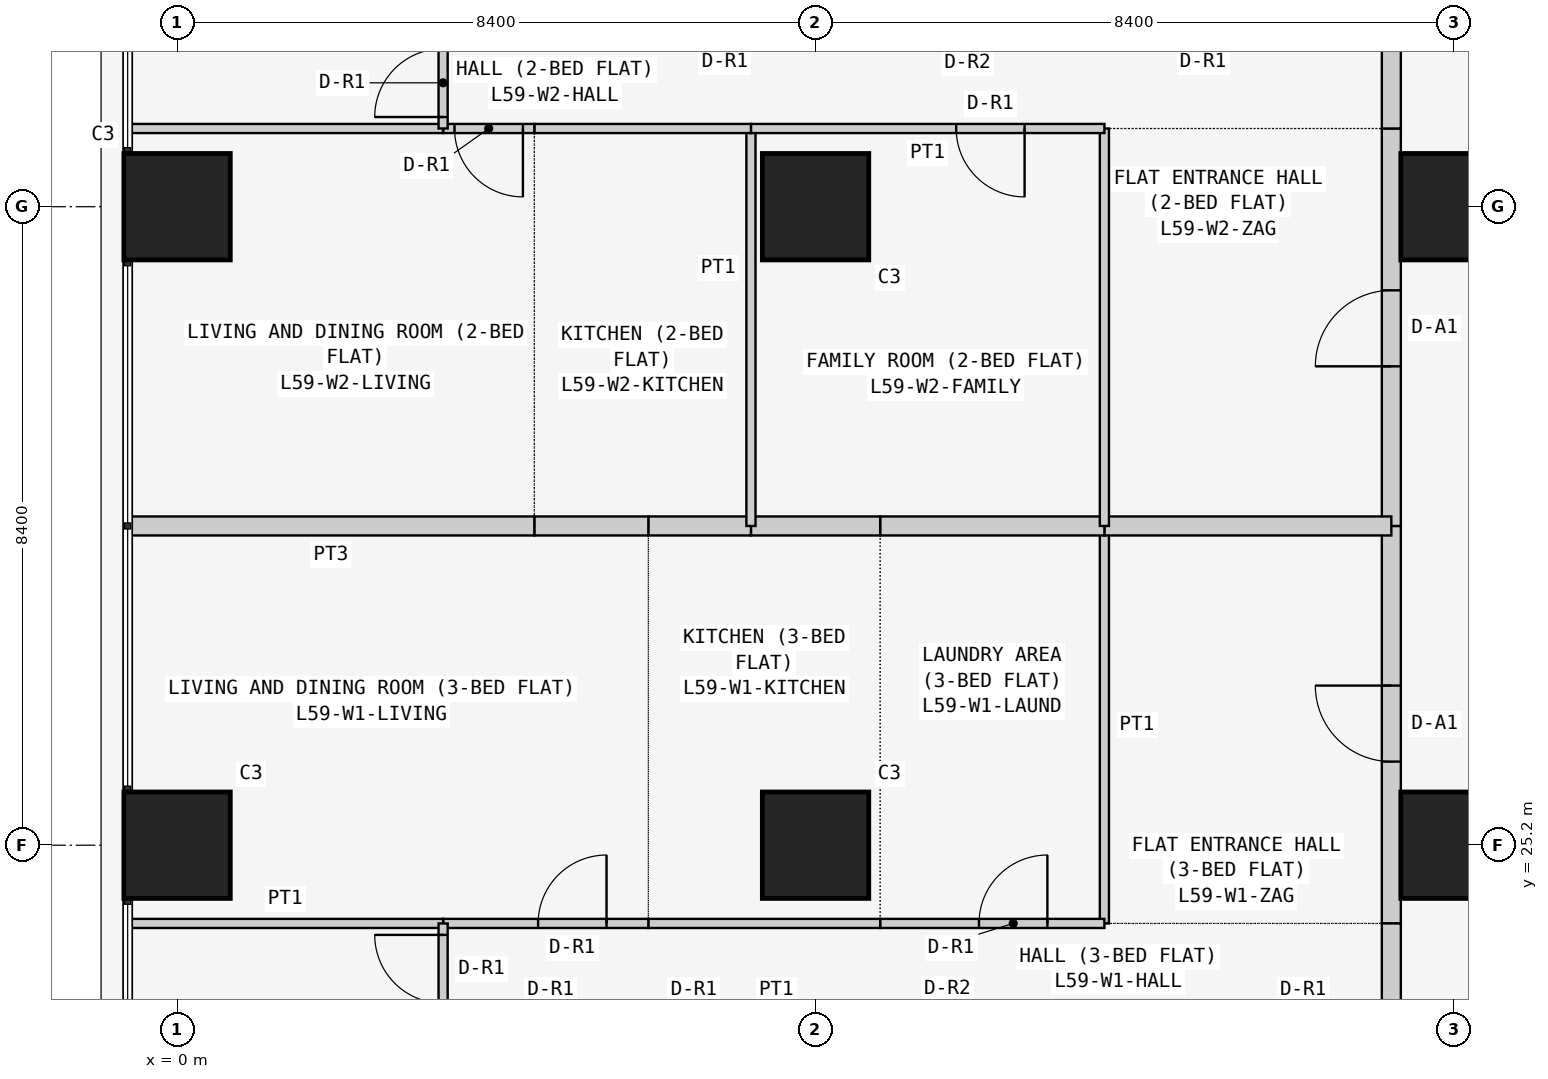
"""IFC4 building model, lengths in metres.
Left out: names, types, materials, properties, quantities, classifications, styles, units other than length and angle.
Written with IfcOpenShell. Run it as: python <this file> out.ifc"""

import sys

from ifc_helpers import new_model, si_unit, direction, frame, frame_2d, origin, origin_2d, place, context, subcontext, project, spatial, rectangle, extrude, element, fill, save


model = new_model("IFC4")
c1 = context("Model", 3, precision=1e-05, world=origin(), true_north=direction((0.0, 1.0)))
c2 = subcontext(c1, "Body", "Model", "MODEL_VIEW")
j1 = project(units=[si_unit("LENGTHUNIT", "METRE"), si_unit("PLANEANGLEUNIT", "RADIAN")], contexts=[c1])
p1 = place(None, origin())
s1 = spatial("IfcSite", under=j1, at=p1, CompositionType="ELEMENT")
p2 = place(p1, origin())
s2 = spatial("IfcBuilding", under=s1, at=p2, CompositionType="ELEMENT")
p3 = place(p2, frame((0.0, 0.0, 226.5)))
s3 = spatial("IfcBuildingStorey", under=s2, at=p3, CompositionType="ELEMENT", Elevation=226.5)
for number, where, z_axis, x_axis in (
    (1, (0.0, 25.2, 0.0), (0.0, 0.0, 1.0), (1.0, 0.0, 0.0)),
    (2, (0.0, 33.6, 0.0), (0.0, 0.0, 1.0), (1.0, 0.0, 0.0)),
    (3, (8.4, 25.2, 0.0), (0.0, 0.0, 1.0), (1.0, 0.0, 0.0)),
    (4, (8.4, 33.6, 0.0), (0.0, 0.0, 1.0), (1.0, 0.0, 0.0)),
    (5, (16.8, 25.2, 0.0), (0.0, 0.0, 1.0), (1.0, 0.0, 0.0)),
    (6, (16.8, 33.6, 0.0), (0.0, 0.0, 1.0), (1.0, 0.0, 0.0)),
):
    element("IfcColumn", number, at=place(p3, frame(where, z_axis=z_axis, x_axis=x_axis)), inside=s3, PredefinedType="COLUMN", context=c2, shape_type="SweptSolid", body=[
        extrude(rectangle(XDim=1.4, YDim=1.4, at=origin_2d()), origin(), (0.0, 0.0, 1.0), 3.6),
    ])
p4 = place(p3, frame((15.975, 24.171, 0.0), z_axis=(0.0, 0.0, 1.0), x_axis=(0.0, 1.0, 0.0)))
e7 = element("IfcWall", 7, at=p4, inside=s3, PredefinedType="PARTITIONING", context=c2, shape_type="SweptSolid", body=[
    extrude(rectangle(XDim=5.229, YDim=0.25, at=frame_2d((2.615, 0.0))), origin(), (0.0, 0.0, 1.0), 3.45),
])
p5 = place(p4, frame((2.129, 0.0, 0.0)))
e8 = element("IfcOpeningElement", 8, at=p5, cuts=e7, PredefinedType="OPENING", context=c2, shape_type="SweptSolid", body=[
    extrude(rectangle(XDim=1.0, YDim=2.1, at=frame_2d((0.5, 1.05))), frame((0.0, 0.135, 0.0), z_axis=(0.0, -1.0, 0.0), x_axis=(1.0, 0.0, 0.0)), (0.0, 0.0, 1.0), 0.27),
])
p6 = place(p3, frame((15.975, 22.971, 0.0), z_axis=(0.0, 0.0, 1.0), x_axis=(0.0, 1.0, 0.0)))
e9 = element("IfcWall", 9, at=p6, inside=s3, PredefinedType="PARTITIONING", context=c2, shape_type="SweptSolid", body=[
    extrude(rectangle(XDim=1.2, YDim=0.25, at=frame_2d((0.6, 0.0))), origin(), (0.0, 0.0, 1.0), 3.45),
])
p7 = place(p3, frame((15.975, 29.4, 0.0), z_axis=(0.0, 0.0, 1.0), x_axis=(0.0, 1.0, 0.0)))
e10 = element("IfcWall", 10, at=p7, inside=s3, PredefinedType="PARTITIONING", context=c2, shape_type="SweptSolid", body=[
    extrude(rectangle(XDim=5.229, YDim=0.25, at=frame_2d((2.615, 0.0))), origin(), (0.0, 0.0, 1.0), 3.45),
])
p8 = place(p7, frame((2.1, 0.0, 0.0)))
e11 = element("IfcOpeningElement", 11, at=p8, cuts=e10, PredefinedType="OPENING", context=c2, shape_type="SweptSolid", body=[
    extrude(rectangle(XDim=1.0, YDim=2.1, at=frame_2d((0.5, 1.05))), frame((0.0, 0.135, 0.0), z_axis=(0.0, -1.0, 0.0), x_axis=(1.0, 0.0, 0.0)), (0.0, 0.0, 1.0), 0.27),
])
p9 = place(p3, frame((15.975, 34.629, 0.0), z_axis=(0.0, 0.0, 1.0), x_axis=(0.0, 1.0, 0.0)))
e12 = element("IfcWall", 12, at=p9, inside=s3, PredefinedType="PARTITIONING", context=c2, shape_type="SweptSolid", body=[
    extrude(rectangle(XDim=1.2, YDim=0.25, at=frame_2d((0.6, 0.0))), origin(), (0.0, 0.0, 1.0), 3.45),
])
p10 = place(p3, frame((12.2, 29.4, 0.0), z_axis=(0.0, 0.0, 1.0), x_axis=(0.0, -1.0, 0.0)))
e13 = element("IfcWall", 13, at=p10, inside=s3, PredefinedType="PARTITIONING", context=c2, shape_type="SweptSolid", body=[
    extrude(rectangle(XDim=5.229, YDim=0.12, at=frame_2d((2.615, 0.0))), origin(), (0.0, 0.0, 1.0), 3.45),
])
p11 = place(p3, frame((15.975, 29.4, 0.0), z_axis=(0.0, 0.0, 1.0), x_axis=(-1.0, 0.0, 0.0)))
e14 = element("IfcWall", 14, at=p11, inside=s3, PredefinedType="PARTITIONING", context=c2, shape_type="SweptSolid", body=[
    extrude(rectangle(XDim=3.775, YDim=0.25, at=frame_2d((1.888, 0.0))), origin(), (0.0, 0.0, 1.0), 3.45),
])
p12 = place(p3, frame((9.25, 24.171, 0.0), z_axis=(0.0, 0.0, 1.0), x_axis=(1.0, 0.0, 0.0)))
e15 = element("IfcWall", 15, at=p12, inside=s3, PredefinedType="PARTITIONING", context=c2, shape_type="SweptSolid", body=[
    extrude(rectangle(XDim=2.95, YDim=0.12, at=frame_2d((1.475, 0.0))), origin(), (0.0, 0.0, 1.0), 3.45),
])
p13 = place(p12, frame((1.3, 0.0, 0.0)))
e16 = element("IfcOpeningElement", 16, at=p13, cuts=e15, PredefinedType="OPENING", context=c2, shape_type="SweptSolid", body=[
    extrude(rectangle(XDim=0.9, YDim=2.1, at=frame_2d((0.45, 1.05))), frame((0.0, 0.07, 0.0), z_axis=(0.0, -1.0, 0.0), x_axis=(1.0, 0.0, 0.0)), (0.0, 0.0, 1.0), 0.14),
])
p14 = place(p3, frame((12.2, 29.4, 0.0), z_axis=(0.0, 0.0, 1.0), x_axis=(-1.0, 0.0, 0.0)))
e17 = element("IfcWall", 17, at=p14, inside=s3, PredefinedType="PARTITIONING", context=c2, shape_type="SweptSolid", body=[
    extrude(rectangle(XDim=2.95, YDim=0.25, at=frame_2d((1.475, 0.0))), origin(), (0.0, 0.0, 1.0), 3.45),
])
p15 = place(p3, frame((6.2, 24.171, 0.0), z_axis=(0.0, 0.0, 1.0), x_axis=(1.0, 0.0, 0.0)))
e18 = element("IfcWall", 18, at=p15, inside=s3, PredefinedType="PARTITIONING", context=c2, shape_type="SweptSolid", body=[
    extrude(rectangle(XDim=3.05, YDim=0.12, at=frame_2d((1.525, 0.0))), origin(), (0.0, 0.0, 1.0), 3.45),
])
p16 = place(p3, frame((9.25, 29.4, 0.0), z_axis=(0.0, 0.0, 1.0), x_axis=(-1.0, 0.0, 0.0)))
e19 = element("IfcWall", 19, at=p16, inside=s3, PredefinedType="PARTITIONING", context=c2, shape_type="SweptSolid", body=[
    extrude(rectangle(XDim=1.7, YDim=0.25, at=frame_2d((0.85, 0.0))), origin(), (0.0, 0.0, 1.0), 3.45),
])
p17 = place(p3, frame((7.55, 29.4, 0.0), z_axis=(0.0, 0.0, 1.0), x_axis=(-1.0, 0.0, 0.0)))
e20 = element("IfcWall", 20, at=p17, inside=s3, PredefinedType="PARTITIONING", context=c2, shape_type="SweptSolid", body=[
    extrude(rectangle(XDim=1.35, YDim=0.25, at=frame_2d((0.675, 0.0))), origin(), (0.0, 0.0, 1.0), 3.45),
])
p18 = place(p3, frame((3.5, 24.171, 0.0), z_axis=(0.0, 0.0, 1.0), x_axis=(1.0, 0.0, 0.0)))
e21 = element("IfcWall", 21, at=p18, inside=s3, PredefinedType="PARTITIONING", context=c2, shape_type="SweptSolid", body=[
    extrude(rectangle(XDim=2.7, YDim=0.12, at=frame_2d((1.35, 0.0))), origin(), (0.0, 0.0, 1.0), 3.45),
])
p19 = place(p18, frame((1.25, 0.0, 0.0)))
e22 = element("IfcOpeningElement", 22, at=p19, cuts=e21, PredefinedType="OPENING", context=c2, shape_type="SweptSolid", body=[
    extrude(rectangle(XDim=0.9, YDim=2.1, at=frame_2d((0.45, 1.05))), frame((0.0, 0.07, 0.0), z_axis=(0.0, -1.0, 0.0), x_axis=(1.0, 0.0, 0.0)), (0.0, 0.0, 1.0), 0.14),
])
p20 = place(p3, frame((-0.65, 24.171, 0.0), z_axis=(0.0, 0.0, 1.0), x_axis=(1.0, 0.0, 0.0)))
e23 = element("IfcWall", 23, at=p20, inside=s3, PredefinedType="PARTITIONING", context=c2, shape_type="SweptSolid", body=[
    extrude(rectangle(XDim=4.15, YDim=0.12, at=frame_2d((2.075, 0.0))), origin(), (0.0, 0.0, 1.0), 3.45),
])
p21 = place(p3, frame((6.2, 29.4, 0.0), z_axis=(0.0, 0.0, 1.0), x_axis=(-1.0, 0.0, 0.0)))
e24 = element("IfcWall", 24, at=p21, inside=s3, PredefinedType="PARTITIONING", context=c2, shape_type="SweptSolid", body=[
    extrude(rectangle(XDim=1.5, YDim=0.25, at=frame_2d((0.75, 0.0))), origin(), (0.0, 0.0, 1.0), 3.45),
])
p22 = place(p3, frame((4.7, 29.4, 0.0), z_axis=(0.0, 0.0, 1.0), x_axis=(-1.0, 0.0, 0.0)))
e25 = element("IfcWall", 25, at=p22, inside=s3, PredefinedType="PARTITIONING", context=c2, shape_type="SweptSolid", body=[
    extrude(rectangle(XDim=5.35, YDim=0.25, at=frame_2d((2.675, 0.0))), origin(), (0.0, 0.0, 1.0), 3.45),
])
p23 = place(p3, frame((3.5, 24.171, 0.0), z_axis=(0.0, 0.0, 1.0), x_axis=(0.0, -1.0, 0.0)))
e26 = element("IfcWall", 26, at=p23, inside=s3, PredefinedType="PARTITIONING", context=c2, shape_type="SweptSolid", body=[
    extrude(rectangle(XDim=1.2, YDim=0.12, at=frame_2d((0.6, 0.0))), origin(), (0.0, 0.0, 1.0), 3.45),
])
p24 = place(p23, frame((0.151, 0.0, 0.0)))
e27 = element("IfcOpeningElement", 27, at=p24, cuts=e26, PredefinedType="OPENING", context=c2, shape_type="SweptSolid", body=[
    extrude(rectangle(XDim=0.9, YDim=2.1, at=frame_2d((0.45, 1.05))), frame((0.0, 0.07, 0.0), z_axis=(0.0, -1.0, 0.0), x_axis=(1.0, 0.0, 0.0)), (0.0, 0.0, 1.0), 0.14),
])
for number, where, z_axis, x_axis in (
    (28, (12.2, 29.4, 0.0), (0.0, 0.0, 1.0), (0.0, 1.0, 0.0)),
    (29, (7.55, 29.4, 0.0), (0.0, 0.0, 1.0), (0.0, 1.0, 0.0)),
):
    element("IfcWall", number, at=place(p3, frame(where, z_axis=z_axis, x_axis=x_axis)), inside=s3, PredefinedType="PARTITIONING", context=c2, shape_type="SweptSolid", body=[
        extrude(rectangle(XDim=5.229, YDim=0.12, at=frame_2d((2.615, 0.0))), origin(), (0.0, 0.0, 1.0), 3.45),
    ])
p25 = place(p3, frame((7.55, 34.629, 0.0), z_axis=(0.0, 0.0, 1.0), x_axis=(1.0, 0.0, 0.0)))
e30 = element("IfcWall", 30, at=p25, inside=s3, PredefinedType="PARTITIONING", context=c2, shape_type="SweptSolid", body=[
    extrude(rectangle(XDim=4.65, YDim=0.12, at=frame_2d((2.325, 0.0))), origin(), (0.0, 0.0, 1.0), 3.45),
])
p26 = place(p25, frame((2.7, 0.0, 0.0)))
e31 = element("IfcOpeningElement", 31, at=p26, cuts=e30, PredefinedType="OPENING", context=c2, shape_type="SweptSolid", body=[
    extrude(rectangle(XDim=0.9, YDim=2.1, at=frame_2d((0.45, 1.05))), frame((0.0, 0.07, 0.0), z_axis=(0.0, -1.0, 0.0), x_axis=(1.0, 0.0, 0.0)), (0.0, 0.0, 1.0), 0.14),
])
p27 = place(p3, frame((4.7, 34.629, 0.0), z_axis=(0.0, 0.0, 1.0), x_axis=(1.0, 0.0, 0.0)))
e32 = element("IfcWall", 32, at=p27, inside=s3, PredefinedType="PARTITIONING", context=c2, shape_type="SweptSolid", body=[
    extrude(rectangle(XDim=2.85, YDim=0.12, at=frame_2d((1.425, 0.0))), origin(), (0.0, 0.0, 1.0), 3.45),
])
p28 = place(p3, frame((3.5, 34.629, 0.0), z_axis=(0.0, 0.0, 1.0), x_axis=(1.0, 0.0, 0.0)))
e33 = element("IfcWall", 33, at=p28, inside=s3, PredefinedType="PARTITIONING", context=c2, shape_type="SweptSolid", body=[
    extrude(rectangle(XDim=1.2, YDim=0.12, at=frame_2d((0.6, 0.0))), origin(), (0.0, 0.0, 1.0), 3.45),
])
p29 = place(p28, frame((0.15, 0.0, 0.0)))
e34 = element("IfcOpeningElement", 34, at=p29, cuts=e33, PredefinedType="OPENING", context=c2, shape_type="SweptSolid", body=[
    extrude(rectangle(XDim=0.9, YDim=2.1, at=frame_2d((0.45, 1.05))), frame((0.0, 0.07, 0.0), z_axis=(0.0, -1.0, 0.0), x_axis=(1.0, 0.0, 0.0)), (0.0, 0.0, 1.0), 0.14),
])
p30 = place(p3, frame((-0.65, 34.629, 0.0), z_axis=(0.0, 0.0, 1.0), x_axis=(1.0, 0.0, 0.0)))
e35 = element("IfcWall", 35, at=p30, inside=s3, PredefinedType="PARTITIONING", context=c2, shape_type="SweptSolid", body=[
    extrude(rectangle(XDim=4.15, YDim=0.12, at=frame_2d((2.075, 0.0))), origin(), (0.0, 0.0, 1.0), 3.45),
])
p31 = place(p3, frame((3.5, 34.629, 0.0), z_axis=(0.0, 0.0, 1.0), x_axis=(0.0, 1.0, 0.0)))
e36 = element("IfcWall", 36, at=p31, inside=s3, PredefinedType="PARTITIONING", context=c2, shape_type="SweptSolid", body=[
    extrude(rectangle(XDim=1.2, YDim=0.12, at=frame_2d((0.6, 0.0))), origin(), (0.0, 0.0, 1.0), 3.45),
])
p32 = place(p31, frame((0.151, 0.0, 0.0)))
e37 = element("IfcOpeningElement", 37, at=p32, cuts=e36, PredefinedType="OPENING", context=c2, shape_type="SweptSolid", body=[
    extrude(rectangle(XDim=0.9, YDim=2.1, at=frame_2d((0.45, 1.05))), frame((0.0, 0.07, 0.0), z_axis=(0.0, -1.0, 0.0), x_axis=(1.0, 0.0, 0.0)), (0.0, 0.0, 1.0), 0.14),
])
p33 = place(p5, origin())
e38 = element("IfcDoor", 38, at=p33, inside=s3, OperationType="SINGLE_SWING_RIGHT", PredefinedType="DOOR", context=c2, shape_type="SweptSolid", body=[
    extrude(rectangle(XDim=1.0, YDim=2.1, at=frame_2d((0.5, 1.05))), frame((0.0, 0.025, 0.0), z_axis=(0.0, -1.0, 0.0), x_axis=(1.0, 0.0, 0.0)), (0.0, 0.0, 1.0), 0.05),
])
fill(e8, e38)
p34 = place(p13, origin())
e39 = element("IfcDoor", 39, at=p34, inside=s3, OperationType="SINGLE_SWING_RIGHT", PredefinedType="DOOR", context=c2, shape_type="SweptSolid", body=[
    extrude(rectangle(XDim=0.9, YDim=2.1, at=frame_2d((0.45, 1.05))), frame((0.0, 0.025, 0.0), z_axis=(0.0, -1.0, 0.0), x_axis=(1.0, 0.0, 0.0)), (0.0, 0.0, 1.0), 0.05),
])
fill(e16, e39)
p35 = place(p19, origin())
e40 = element("IfcDoor", 40, at=p35, inside=s3, OperationType="SINGLE_SWING_RIGHT", PredefinedType="DOOR", context=c2, shape_type="SweptSolid", body=[
    extrude(rectangle(XDim=0.9, YDim=2.1, at=frame_2d((0.45, 1.05))), frame((0.0, 0.025, 0.0), z_axis=(0.0, -1.0, 0.0), x_axis=(1.0, 0.0, 0.0)), (0.0, 0.0, 1.0), 0.05),
])
fill(e22, e40)
p36 = place(p24, frame((0.9, 0.0, 0.0), z_axis=(0.0, 0.0, 1.0), x_axis=(-1.0, 0.0, 0.0)))
e41 = element("IfcDoor", 41, at=p36, inside=s3, OperationType="SINGLE_SWING_RIGHT", PredefinedType="DOOR", context=c2, shape_type="SweptSolid", body=[
    extrude(rectangle(XDim=0.9, YDim=2.1, at=frame_2d((0.45, 1.05))), frame((0.0, 0.025, 0.0), z_axis=(0.0, -1.0, 0.0), x_axis=(1.0, 0.0, 0.0)), (0.0, 0.0, 1.0), 0.05),
])
fill(e27, e41)
p37 = place(p8, origin())
e42 = element("IfcDoor", 42, at=p37, inside=s3, OperationType="SINGLE_SWING_LEFT", PredefinedType="DOOR", context=c2, shape_type="SweptSolid", body=[
    extrude(rectangle(XDim=1.0, YDim=2.1, at=frame_2d((0.5, 1.05))), frame((0.0, 0.025, 0.0), z_axis=(0.0, -1.0, 0.0), x_axis=(1.0, 0.0, 0.0)), (0.0, 0.0, 1.0), 0.05),
])
fill(e11, e42)
p38 = place(p26, frame((0.9, 0.0, 0.0), z_axis=(0.0, 0.0, 1.0), x_axis=(-1.0, 0.0, 0.0)))
e43 = element("IfcDoor", 43, at=p38, inside=s3, OperationType="SINGLE_SWING_LEFT", PredefinedType="DOOR", context=c2, shape_type="SweptSolid", body=[
    extrude(rectangle(XDim=0.9, YDim=2.1, at=frame_2d((0.45, 1.05))), frame((0.0, 0.025, 0.0), z_axis=(0.0, -1.0, 0.0), x_axis=(1.0, 0.0, 0.0)), (0.0, 0.0, 1.0), 0.05),
])
fill(e31, e43)
p39 = place(p29, frame((0.9, 0.0, 0.0), z_axis=(0.0, 0.0, 1.0), x_axis=(-1.0, 0.0, 0.0)))
e44 = element("IfcDoor", 44, at=p39, inside=s3, OperationType="SINGLE_SWING_LEFT", PredefinedType="DOOR", context=c2, shape_type="SweptSolid", body=[
    extrude(rectangle(XDim=0.9, YDim=2.1, at=frame_2d((0.45, 1.05))), frame((0.0, 0.025, 0.0), z_axis=(0.0, -1.0, 0.0), x_axis=(1.0, 0.0, 0.0)), (0.0, 0.0, 1.0), 0.05),
])
fill(e34, e44)
p40 = place(p32, origin())
e45 = element("IfcDoor", 45, at=p40, inside=s3, OperationType="SINGLE_SWING_LEFT", PredefinedType="DOOR", context=c2, shape_type="SweptSolid", body=[
    extrude(rectangle(XDim=0.9, YDim=2.1, at=frame_2d((0.45, 1.05))), frame((0.0, 0.025, 0.0), z_axis=(0.0, -1.0, 0.0), x_axis=(1.0, 0.0, 0.0)), (0.0, 0.0, 1.0), 0.05),
])
fill(e37, e45)
save(model, sys.argv[1])
